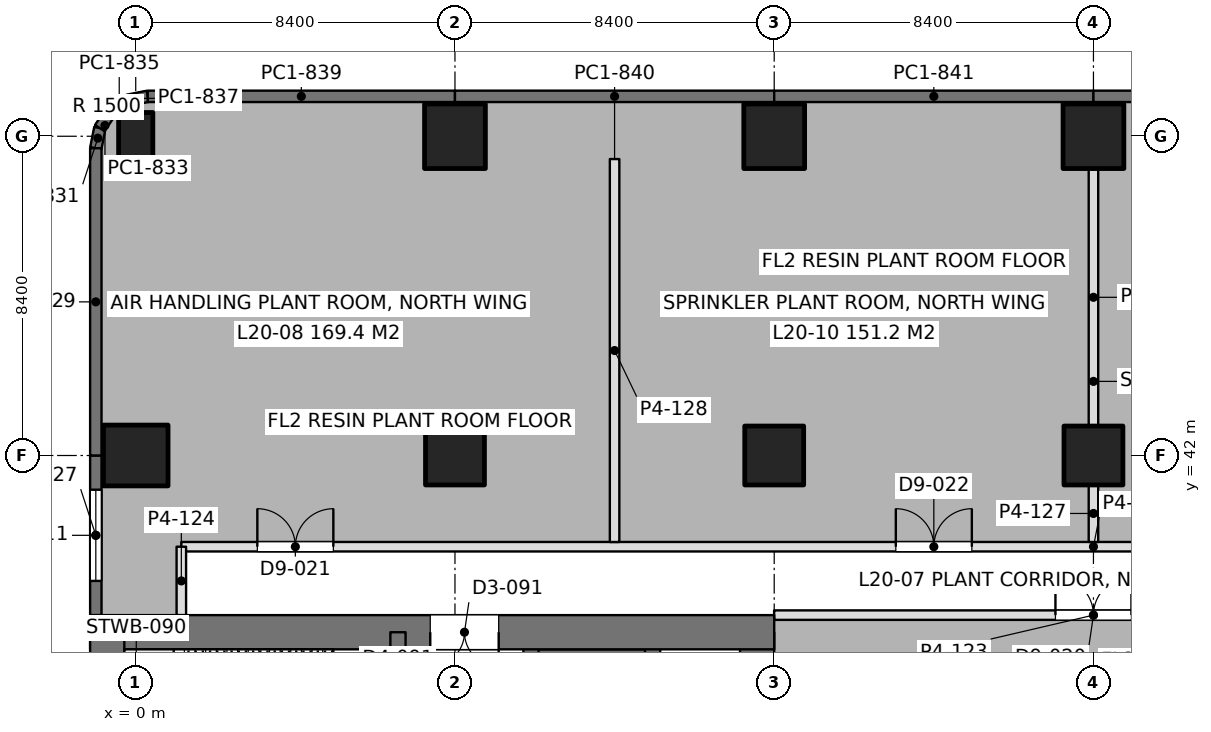
"""IFC4 building model, lengths in metres.
Left out: names, types, materials, properties, quantities, classifications, styles, units other than length and angle.
Written with IfcOpenShell. Run it as: python <this file> out.ifc"""

import sys

from ifc_helpers import new_model, si_unit, direction, frame, frame_2d, origin, origin_2d, place, context, subcontext, project, spatial, rectangle, extrude, element, fill, save


model = new_model("IFC4")
c1 = context("Model", 3, precision=1e-05, world=origin(), true_north=direction((0.0, 1.0)))
c2 = subcontext(c1, "Body", "Model", "MODEL_VIEW")
j1 = project(units=[si_unit("LENGTHUNIT", "METRE"), si_unit("PLANEANGLEUNIT", "RADIAN")], contexts=[c1])
p1 = place(None, origin())
s1 = spatial("IfcSite", under=j1, at=p1, CompositionType="ELEMENT")
p2 = place(p1, origin())
s2 = spatial("IfcBuilding", under=s1, at=p2, CompositionType="ELEMENT")
p3 = place(p2, frame((0.0, 0.0, 90.9)))
s3 = spatial("IfcBuildingStorey", under=s2, at=p3, CompositionType="ELEMENT", Elevation=90.9)
p4 = place(p3, frame((0.0, 42.0, 0.0), z_axis=(0.0, 0.0, 1.0), x_axis=(0.0, 1.0, 0.0)))
e1 = element("IfcColumn", 1, at=p4, inside=s3, PredefinedType="COLUMN", context=c2, shape_type="SweptSolid", body=[
    extrude(rectangle(XDim=1.6, YDim=1.7, at=origin_2d()), origin(), (0.0, 0.0, 1.0), 5.4),
])
p5 = place(p3, frame((0.0, 50.4, 0.0), z_axis=(0.0, 0.0, 1.0), x_axis=(1.0, 0.0, 0.0)))
e2 = element("IfcColumn", 2, at=p5, inside=s3, PredefinedType="COLUMN", context=c2, shape_type="SweptSolid", body=[
    extrude(rectangle(XDim=0.9, YDim=1.25, at=origin_2d()), origin(), (0.0, 0.0, 1.0), 5.24),
])
p6 = place(p3, frame((8.4, 42.0, 0.0), z_axis=(0.0, 0.0, 1.0), x_axis=(1.0, 0.0, 0.0)))
e3 = element("IfcColumn", 3, at=p6, inside=s3, PredefinedType="COLUMN", context=c2, shape_type="SweptSolid", body=[
    extrude(rectangle(XDim=1.55, YDim=1.55, at=origin_2d()), origin(), (0.0, 0.0, 1.0), 5.4),
])
p7 = place(p3, frame((8.4, 50.4, 0.0), z_axis=(0.0, 0.0, 1.0), x_axis=(1.0, 0.0, 0.0)))
e4 = element("IfcColumn", 4, at=p7, inside=s3, PredefinedType="COLUMN", context=c2, shape_type="SweptSolid", body=[
    extrude(rectangle(XDim=1.6, YDim=1.7, at=origin_2d()), origin(), (0.0, 0.0, 1.0), 5.24),
])
p8 = place(p3, frame((16.8, 42.0, 0.0), z_axis=(0.0, 0.0, 1.0), x_axis=(1.0, 0.0, 0.0)))
e5 = element("IfcColumn", 5, at=p8, inside=s3, PredefinedType="COLUMN", context=c2, shape_type="SweptSolid", body=[
    extrude(rectangle(XDim=1.55, YDim=1.55, at=origin_2d()), origin(), (0.0, 0.0, 1.0), 5.4),
])
p9 = place(p3, frame((16.8, 50.4, 0.0), z_axis=(0.0, 0.0, 1.0), x_axis=(1.0, 0.0, 0.0)))
e6 = element("IfcColumn", 6, at=p9, inside=s3, PredefinedType="COLUMN", context=c2, shape_type="SweptSolid", body=[
    extrude(rectangle(XDim=1.6, YDim=1.7, at=origin_2d()), origin(), (0.0, 0.0, 1.0), 5.24),
])
p10 = place(p3, frame((25.2, 42.0, 0.0), z_axis=(0.0, 0.0, 1.0), x_axis=(1.0, 0.0, 0.0)))
e7 = element("IfcColumn", 7, at=p10, inside=s3, PredefinedType="COLUMN", context=c2, shape_type="SweptSolid", body=[
    extrude(rectangle(XDim=1.55, YDim=1.55, at=origin_2d()), origin(), (0.0, 0.0, 1.0), 5.4),
])
p11 = place(p3, frame((25.2, 50.4, 0.0), z_axis=(0.0, 0.0, 1.0), x_axis=(1.0, 0.0, 0.0)))
e8 = element("IfcColumn", 8, at=p11, inside=s3, PredefinedType="COLUMN", context=c2, shape_type="SweptSolid", body=[
    extrude(rectangle(XDim=1.6, YDim=1.7, at=origin_2d()), origin(), (0.0, 0.0, 1.0), 5.24),
])
p12 = place(p3, frame((-1.2, 37.35, 0.0), z_axis=(0.0, 0.0, 1.0), x_axis=(1.0, 0.0, 0.0)))
e9 = element("IfcWall", 9, at=p12, inside=s3, PredefinedType="SHEAR", context=c2, shape_type="SweptSolid", body=[
    extrude(rectangle(XDim=18.0, YDim=0.9, at=frame_2d((9.0, 0.0))), origin(), (0.0, 0.0, 1.0), 5.4),
])
p13 = place(p12, frame((8.95, 0.0, 0.0)))
e10 = element("IfcOpeningElement", 10, at=p13, cuts=e9, PredefinedType="OPENING", context=c2, shape_type="SweptSolid", body=[
    extrude(rectangle(XDim=1.8, YDim=2.4, at=frame_2d((0.9, 1.2))), frame((0.0, 0.46, 0.0), z_axis=(0.0, -1.0, 0.0), x_axis=(1.0, 0.0, 0.0)), (0.0, 0.0, 1.0), 0.92),
])
for number, where, z_axis, x_axis in (
    (11, (-0.75, 13.05, 0.0), (0.0, 0.0, 1.0), (0.0, 1.0, 0.0)),
    (12, (16.35, 13.05, 0.0), (0.0, 0.0, 1.0), (0.0, 1.0, 0.0)),
):
    element("IfcWall", number, at=place(p3, frame(where, z_axis=z_axis, x_axis=x_axis)), inside=s3, PredefinedType="SHEAR", context=c2, shape_type="SweptSolid", body=[
        extrude(rectangle(XDim=24.3, YDim=0.9, at=frame_2d((12.15, 0.0))), origin(), (0.0, 0.0, 1.0), 5.4),
    ])
p14 = place(p3, frame((6.9, 13.05, 0.0), z_axis=(0.0, 0.0, 1.0), x_axis=(0.0, 1.0, 0.0)))
e13 = element("IfcWall", 13, at=p14, inside=s3, PredefinedType="SHEAR", context=c2, shape_type="SweptSolid", body=[
    extrude(rectangle(XDim=24.3, YDim=0.4, at=frame_2d((12.15, 0.0))), origin(), (0.0, 0.0, 1.0), 5.4),
])
p15 = place(p14, frame((1.3, 0.0, 0.0)))
e14 = element("IfcOpeningElement", 14, at=p15, cuts=e13, PredefinedType="OPENING", context=c2, shape_type="SweptSolid", body=[
    extrude(rectangle(XDim=1.0, YDim=2.2, at=frame_2d((0.5, 1.1))), frame((0.0, 0.21, 0.0), z_axis=(0.0, -1.0, 0.0), x_axis=(1.0, 0.0, 0.0)), (0.0, 0.0, 1.0), 0.42),
])
p16 = place(p14, frame((22.0, 0.0, 0.0)))
e15 = element("IfcOpeningElement", 15, at=p16, cuts=e13, PredefinedType="OPENING", context=c2, shape_type="SweptSolid", body=[
    extrude(rectangle(XDim=1.0, YDim=2.2, at=frame_2d((0.5, 1.1))), frame((0.0, 0.21, 0.0), z_axis=(0.0, -1.0, 0.0), x_axis=(1.0, 0.0, 0.0)), (0.0, 0.0, 1.0), 0.42),
])
p17 = place(p14, frame((5.55, 0.0, 0.0)))
e16 = element("IfcOpeningElement", 16, at=p17, cuts=e13, PredefinedType="OPENING", context=c2, shape_type="SweptSolid", body=[
    extrude(rectangle(XDim=1.0, YDim=2.2, at=frame_2d((0.5, 1.1))), frame((0.0, 0.21, 0.0), z_axis=(0.0, -1.0, 0.0), x_axis=(1.0, 0.0, 0.0)), (0.0, 0.0, 1.0), 0.42),
])
p18 = place(p14, frame((9.55, 0.0, 0.0)))
e17 = element("IfcOpeningElement", 17, at=p18, cuts=e13, PredefinedType="OPENING", context=c2, shape_type="SweptSolid", body=[
    extrude(rectangle(XDim=1.0, YDim=2.2, at=frame_2d((0.5, 1.1))), frame((0.0, 0.21, 0.0), z_axis=(0.0, -1.0, 0.0), x_axis=(1.0, 0.0, 0.0)), (0.0, 0.0, 1.0), 0.42),
])
p19 = place(p14, frame((12.8, 0.0, 0.0)))
e18 = element("IfcOpeningElement", 18, at=p19, cuts=e13, PredefinedType="OPENING", context=c2, shape_type="SweptSolid", body=[
    extrude(rectangle(XDim=1.1, YDim=2.2, at=frame_2d((0.55, 1.1))), frame((0.0, 0.21, 0.0), z_axis=(0.0, -1.0, 0.0), x_axis=(1.0, 0.0, 0.0)), (0.0, 0.0, 1.0), 0.42),
])
p20 = place(p14, frame((15.538, 0.0, 0.0)))
e19 = element("IfcOpeningElement", 19, at=p20, cuts=e13, PredefinedType="OPENING", context=c2, shape_type="SweptSolid", body=[
    extrude(rectangle(XDim=1.1, YDim=2.2, at=frame_2d((0.55, 1.1))), frame((0.0, 0.21, 0.0), z_axis=(0.0, -1.0, 0.0), x_axis=(1.0, 0.0, 0.0)), (0.0, 0.0, 1.0), 0.42),
])
p21 = place(p14, frame((18.262, 0.0, 0.0)))
e20 = element("IfcOpeningElement", 20, at=p21, cuts=e13, PredefinedType="OPENING", context=c2, shape_type="SweptSolid", body=[
    extrude(rectangle(XDim=1.1, YDim=2.2, at=frame_2d((0.55, 1.1))), frame((0.0, 0.21, 0.0), z_axis=(0.0, -1.0, 0.0), x_axis=(1.0, 0.0, 0.0)), (0.0, 0.0, 1.0), 0.42),
])
p22 = place(p3, frame((10.4, 13.05, 0.0), z_axis=(0.0, 0.0, 1.0), x_axis=(0.0, 1.0, 0.0)))
e21 = element("IfcWall", 21, at=p22, inside=s3, PredefinedType="SHEAR", context=c2, shape_type="SweptSolid", body=[
    extrude(rectangle(XDim=24.3, YDim=0.4, at=frame_2d((12.15, 0.0))), origin(), (0.0, 0.0, 1.0), 5.4),
])
p23 = place(p22, frame((1.5, 0.0, 0.0)))
e22 = element("IfcOpeningElement", 22, at=p23, cuts=e21, PredefinedType="OPENING", context=c2, shape_type="SweptSolid", body=[
    extrude(rectangle(XDim=1.1, YDim=2.2, at=frame_2d((0.55, 1.1))), frame((0.0, 0.21, 0.0), z_axis=(0.0, -1.0, 0.0), x_axis=(1.0, 0.0, 0.0)), (0.0, 0.0, 1.0), 0.42),
])
p24 = place(p22, frame((4.35, 0.0, 0.0)))
e23 = element("IfcOpeningElement", 23, at=p24, cuts=e21, PredefinedType="OPENING", context=c2, shape_type="SweptSolid", body=[
    extrude(rectangle(XDim=1.1, YDim=2.2, at=frame_2d((0.55, 1.1))), frame((0.0, 0.21, 0.0), z_axis=(0.0, -1.0, 0.0), x_axis=(1.0, 0.0, 0.0)), (0.0, 0.0, 1.0), 0.42),
])
p25 = place(p22, frame((7.2, 0.0, 0.0)))
e24 = element("IfcOpeningElement", 24, at=p25, cuts=e21, PredefinedType="OPENING", context=c2, shape_type="SweptSolid", body=[
    extrude(rectangle(XDim=1.1, YDim=2.2, at=frame_2d((0.55, 1.1))), frame((0.0, 0.21, 0.0), z_axis=(0.0, -1.0, 0.0), x_axis=(1.0, 0.0, 0.0)), (0.0, 0.0, 1.0), 0.42),
])
p26 = place(p22, frame((21.45, 0.0, 0.0)))
e25 = element("IfcOpeningElement", 25, at=p26, cuts=e21, PredefinedType="OPENING", context=c2, shape_type="SweptSolid", body=[
    extrude(rectangle(XDim=1.1, YDim=2.2, at=frame_2d((0.55, 1.1))), frame((0.0, 0.21, 0.0), z_axis=(0.0, -1.0, 0.0), x_axis=(1.0, 0.0, 0.0)), (0.0, 0.0, 1.0), 0.42),
])
p27 = place(p3, frame((13.6, 13.05, 0.0), z_axis=(0.0, 0.0, 1.0), x_axis=(0.0, 1.0, 0.0)))
e26 = element("IfcWall", 26, at=p27, inside=s3, PredefinedType="SHEAR", context=c2, shape_type="SweptSolid", body=[
    extrude(rectangle(XDim=24.3, YDim=0.4, at=frame_2d((12.15, 0.0))), origin(), (0.0, 0.0, 1.0), 5.4),
])
p28 = place(p3, frame((10.4, 36.625, 0.0), z_axis=(0.0, 0.0, 1.0), x_axis=(1.0, 0.0, 0.0)))
e27 = element("IfcWall", 27, at=p28, inside=s3, PredefinedType="SHEAR", context=c2, shape_type="SweptSolid", body=[
    extrude(rectangle(XDim=3.2, YDim=0.55, at=frame_2d((1.6, 0.0))), origin(), (0.0, 0.0, 1.0), 5.4),
])
p29 = place(p3, frame((-1.05, 37.8, 0.0), z_axis=(0.0, 0.0, 1.0), x_axis=(0.0, 1.0, 0.0)))
e28 = element("IfcWall", 28, at=p29, inside=s3, PredefinedType="SOLIDWALL", context=c2, shape_type="SweptSolid", body=[
    extrude(rectangle(XDim=4.2, YDim=0.3, at=frame_2d((2.1, 0.0))), origin(), (0.0, 0.0, 1.0), 5.24),
])
p30 = place(p29, frame((0.9, 0.0, 1.2)))
e29 = element("IfcOpeningElement", 29, at=p30, cuts=e28, PredefinedType="OPENING", context=c2, shape_type="SweptSolid", body=[
    extrude(rectangle(XDim=2.4, YDim=2.4, at=frame_2d((1.2, 1.2))), frame((0.0, 0.16, 0.0), z_axis=(0.0, -1.0, 0.0), x_axis=(1.0, 0.0, 0.0)), (0.0, 0.0, 1.0), 0.32),
])
p31 = place(p3, frame((-1.05, 42.0, 0.0), z_axis=(0.0, 0.0, 1.0), x_axis=(0.0, 1.0, 0.0)))
e30 = element("IfcWall", 30, at=p31, inside=s3, PredefinedType="SOLIDWALL", context=c2, shape_type="SweptSolid", body=[
    extrude(rectangle(XDim=8.085, YDim=0.3, at=frame_2d((4.042, 0.0))), origin(), (0.0, 0.0, 1.0), 5.24),
])
p32 = place(p3, frame((-1.05, 50.085, 0.0), z_axis=(0.0, 0.0, 1.0), x_axis=(0.195073962632, 0.980788534345, 0.0)))
e31 = element("IfcWall", 31, at=p32, inside=s3, PredefinedType="SOLIDWALL", context=c2, shape_type="SweptSolid", body=[
    extrude(rectangle(XDim=0.541, YDim=0.3, at=frame_2d((0.271, 0.0))), origin(), (0.0, 0.0, 1.0), 5.04),
])
for number, where, z_axis, x_axis in (
    (32, (-0.945, 50.615, 0.0), (0.0, 0.0, 1.0), (0.556, 0.831, 0.0)),
    (33, (-0.653, 51.052, 0.0), (0.0, 0.0, 1.0), (0.831, 0.556, 0.0)),
):
    element("IfcWall", number, at=place(p3, frame(where, z_axis=z_axis, x_axis=x_axis)), inside=s3, PredefinedType="SOLIDWALL", context=c2, shape_type="SweptSolid", body=[
        extrude(rectangle(XDim=0.526, YDim=0.3, at=frame_2d((0.263, 0.0))), origin(), (0.0, 0.0, 1.0), 5.04),
    ])
p33 = place(p3, frame((-0.216, 51.344, 0.0), z_axis=(0.0, 0.0, 1.0), x_axis=(0.980788534345, 0.195073962632, 0.0)))
e34 = element("IfcWall", 34, at=p33, inside=s3, PredefinedType="SOLIDWALL", context=c2, shape_type="SweptSolid", body=[
    extrude(rectangle(XDim=0.541, YDim=0.3, at=frame_2d((0.271, 0.0))), origin(), (0.0, 0.0, 1.0), 5.04),
])
p34 = place(p3, frame((0.315, 51.45, 0.0), z_axis=(0.0, 0.0, 1.0), x_axis=(1.0, 0.0, 0.0)))
e35 = element("IfcWall", 35, at=p34, inside=s3, PredefinedType="SOLIDWALL", context=c2, shape_type="SweptSolid", body=[
    extrude(rectangle(XDim=8.085, YDim=0.3, at=frame_2d((4.042, 0.0))), origin(), (0.0, 0.0, 1.0), 5.04),
])
p35 = place(p3, frame((8.4, 51.45, 0.0), z_axis=(0.0, 0.0, 1.0), x_axis=(1.0, 0.0, 0.0)))
e36 = element("IfcWall", 36, at=p35, inside=s3, PredefinedType="SOLIDWALL", context=c2, shape_type="SweptSolid", body=[
    extrude(rectangle(XDim=8.4, YDim=0.3, at=frame_2d((4.2, 0.0))), origin(), (0.0, 0.0, 1.0), 5.04),
])
p36 = place(p3, frame((16.8, 51.45, 0.0), z_axis=(0.0, 0.0, 1.0), x_axis=(1.0, 0.0, 0.0)))
e37 = element("IfcWall", 37, at=p36, inside=s3, PredefinedType="SOLIDWALL", context=c2, shape_type="SweptSolid", body=[
    extrude(rectangle(XDim=8.4, YDim=0.3, at=frame_2d((4.2, 0.0))), origin(), (0.0, 0.0, 1.0), 5.04),
])
p37 = place(p3, frame((25.2, 51.45, 0.0), z_axis=(0.0, 0.0, 1.0), x_axis=(1.0, 0.0, 0.0)))
e38 = element("IfcWall", 38, at=p37, inside=s3, PredefinedType="SOLIDWALL", context=c2, shape_type="SweptSolid", body=[
    extrude(rectangle(XDim=8.4, YDim=0.3, at=frame_2d((4.2, 0.0))), origin(), (0.0, 0.0, 1.0), 5.04),
])
p38 = place(p3, frame((1.2, 39.6, 0.0), z_axis=(0.0, 0.0, 1.0), x_axis=(1.0, 0.0, 0.0)))
e39 = element("IfcWall", 39, at=p38, inside=s3, PredefinedType="PARTITIONING", context=c2, shape_type="SweptSolid", body=[
    extrude(rectangle(XDim=48.0, YDim=0.25, at=frame_2d((24.0, 0.0))), origin(), (0.0, 0.0, 1.0), 4.64),
])
p39 = place(p38, frame((2.0, 0.0, 0.0)))
e40 = element("IfcOpeningElement", 40, at=p39, cuts=e39, PredefinedType="OPENING", context=c2, shape_type="SweptSolid", body=[
    extrude(rectangle(XDim=2.0, YDim=2.4, at=frame_2d((1.0, 1.2))), frame((0.0, 0.135, 0.0), z_axis=(0.0, -1.0, 0.0), x_axis=(1.0, 0.0, 0.0)), (0.0, 0.0, 1.0), 0.27),
])
p40 = place(p38, frame((18.8, 0.0, 0.0)))
e41 = element("IfcOpeningElement", 41, at=p40, cuts=e39, PredefinedType="OPENING", context=c2, shape_type="SweptSolid", body=[
    extrude(rectangle(XDim=2.0, YDim=2.4, at=frame_2d((1.0, 1.2))), frame((0.0, 0.135, 0.0), z_axis=(0.0, -1.0, 0.0), x_axis=(1.0, 0.0, 0.0)), (0.0, 0.0, 1.0), 0.27),
])
p41 = place(p38, frame((27.2, 0.0, 0.0)))
e42 = element("IfcOpeningElement", 42, at=p41, cuts=e39, PredefinedType="OPENING", context=c2, shape_type="SweptSolid", body=[
    extrude(rectangle(XDim=2.0, YDim=2.4, at=frame_2d((1.0, 1.2))), frame((0.0, 0.135, 0.0), z_axis=(0.0, -1.0, 0.0), x_axis=(1.0, 0.0, 0.0)), (0.0, 0.0, 1.0), 0.27),
])
p42 = place(p38, frame((44.0, 0.0, 0.0)))
e43 = element("IfcOpeningElement", 43, at=p42, cuts=e39, PredefinedType="OPENING", context=c2, shape_type="SweptSolid", body=[
    extrude(rectangle(XDim=2.0, YDim=2.4, at=frame_2d((1.0, 1.2))), frame((0.0, 0.135, 0.0), z_axis=(0.0, -1.0, 0.0), x_axis=(1.0, 0.0, 0.0)), (0.0, 0.0, 1.0), 0.27),
])
p43 = place(p3, frame((1.2, 37.8, 0.0), z_axis=(0.0, 0.0, 1.0), x_axis=(0.0, 1.0, 0.0)))
e44 = element("IfcWall", 44, at=p43, inside=s3, PredefinedType="PARTITIONING", context=c2, shape_type="SweptSolid", body=[
    extrude(rectangle(XDim=1.8, YDim=0.25, at=frame_2d((0.9, 0.0))), origin(), (0.0, 0.0, 1.0), 5.24),
])
p44 = place(p3, frame((25.2, 39.724, 0.0), z_axis=(0.0, 0.0, 1.0), x_axis=(0.0, 1.0, 0.0)))
e45 = element("IfcWall", 45, at=p44, inside=s3, PredefinedType="PARTITIONING", context=c2, shape_type="SweptSolid", body=[
    extrude(rectangle(XDim=1.502, YDim=0.25, at=frame_2d((0.751, 0.0))), origin(), (0.0, 0.0, 1.0), 4.64),
])
p45 = place(p3, frame((25.2, 42.774, 0.0), z_axis=(0.0, 0.0, 1.0), x_axis=(0.0, 1.0, 0.0)))
e46 = element("IfcWall", 46, at=p45, inside=s3, PredefinedType="PARTITIONING", context=c2, shape_type="SweptSolid", body=[
    extrude(rectangle(XDim=6.777, YDim=0.25, at=frame_2d((3.389, 0.0))), origin(), (0.0, 0.0, 1.0), 2.54),
])
p46 = place(p3, frame((12.6, 39.724, 0.0), z_axis=(0.0, 0.0, 1.0), x_axis=(0.0, 1.0, 0.0)))
e47 = element("IfcWall", 47, at=p46, inside=s3, PredefinedType="PARTITIONING", context=c2, shape_type="SweptSolid", body=[
    extrude(rectangle(XDim=10.076, YDim=0.25, at=frame_2d((5.038, 0.0))), origin(), (0.0, 0.0, 1.0), 4.64),
])
p47 = place(p3, frame((16.798, 37.8, 0.0), z_axis=(0.0, 0.0, 1.0), x_axis=(1.0, 0.0, 0.0)))
e48 = element("IfcWall", 48, at=p47, inside=s3, PredefinedType="PARTITIONING", context=c2, shape_type="SweptSolid", body=[
    extrude(rectangle(XDim=16.804, YDim=0.25, at=frame_2d((8.402, 0.0))), origin(), (0.0, 0.0, 1.0), 4.64),
])
p48 = place(p47, frame((7.402, 0.0, 0.0)))
e49 = element("IfcOpeningElement", 49, at=p48, cuts=e48, PredefinedType="OPENING", context=c2, shape_type="SweptSolid", body=[
    extrude(rectangle(XDim=2.0, YDim=2.4, at=frame_2d((1.0, 1.2))), frame((0.0, 0.135, 0.0), z_axis=(0.0, -1.0, 0.0), x_axis=(1.0, 0.0, 0.0)), (0.0, 0.0, 1.0), 0.27),
])
p49 = place(p30, origin())
e50 = element("IfcWindow", 50, at=p49, inside=s3, PartitioningType="SINGLE_PANEL", PredefinedType="USERDEFINED", context=c2, shape_type="SweptSolid", body=[
    extrude(rectangle(XDim=2.4, YDim=2.4, at=frame_2d((1.2, 1.2))), frame((0.0, 0.03, 0.0), z_axis=(0.0, -1.0, 0.0), x_axis=(1.0, 0.0, 0.0)), (0.0, 0.0, 1.0), 0.06),
])
fill(e29, e50)
p50 = place(p13, frame((1.8, 0.0, 0.0), z_axis=(0.0, 0.0, 1.0), x_axis=(-1.0, 0.0, 0.0)))
e51 = element("IfcDoor", 51, at=p50, inside=s3, OperationType="DOUBLE_DOOR_SINGLE_SWING", PredefinedType="DOOR", context=c2, shape_type="SweptSolid", body=[
    extrude(rectangle(XDim=1.8, YDim=2.4, at=frame_2d((0.9, 1.2))), frame((0.0, 0.025, 0.0), z_axis=(0.0, -1.0, 0.0), x_axis=(1.0, 0.0, 0.0)), (0.0, 0.0, 1.0), 0.05),
])
fill(e10, e51)
p51 = place(p39, origin())
e52 = element("IfcDoor", 52, at=p51, inside=s3, OperationType="DOUBLE_DOOR_SINGLE_SWING", PredefinedType="DOOR", context=c2, shape_type="SweptSolid", body=[
    extrude(rectangle(XDim=2.0, YDim=2.4, at=frame_2d((1.0, 1.2))), frame((0.0, 0.025, 0.0), z_axis=(0.0, -1.0, 0.0), x_axis=(1.0, 0.0, 0.0)), (0.0, 0.0, 1.0), 0.05),
])
fill(e40, e52)
p52 = place(p40, origin())
e53 = element("IfcDoor", 53, at=p52, inside=s3, OperationType="DOUBLE_DOOR_SINGLE_SWING", PredefinedType="DOOR", context=c2, shape_type="SweptSolid", body=[
    extrude(rectangle(XDim=2.0, YDim=2.4, at=frame_2d((1.0, 1.2))), frame((0.0, 0.025, 0.0), z_axis=(0.0, -1.0, 0.0), x_axis=(1.0, 0.0, 0.0)), (0.0, 0.0, 1.0), 0.05),
])
fill(e41, e53)
p53 = place(p48, origin())
e54 = element("IfcDoor", 54, at=p53, inside=s3, OperationType="DOUBLE_DOOR_SINGLE_SWING", PredefinedType="DOOR", context=c2, shape_type="SweptSolid", body=[
    extrude(rectangle(XDim=2.0, YDim=2.4, at=frame_2d((1.0, 1.2))), frame((0.0, 0.025, 0.0), z_axis=(0.0, -1.0, 0.0), x_axis=(1.0, 0.0, 0.0)), (0.0, 0.0, 1.0), 0.05),
])
fill(e49, e54)
save(model, sys.argv[1])
